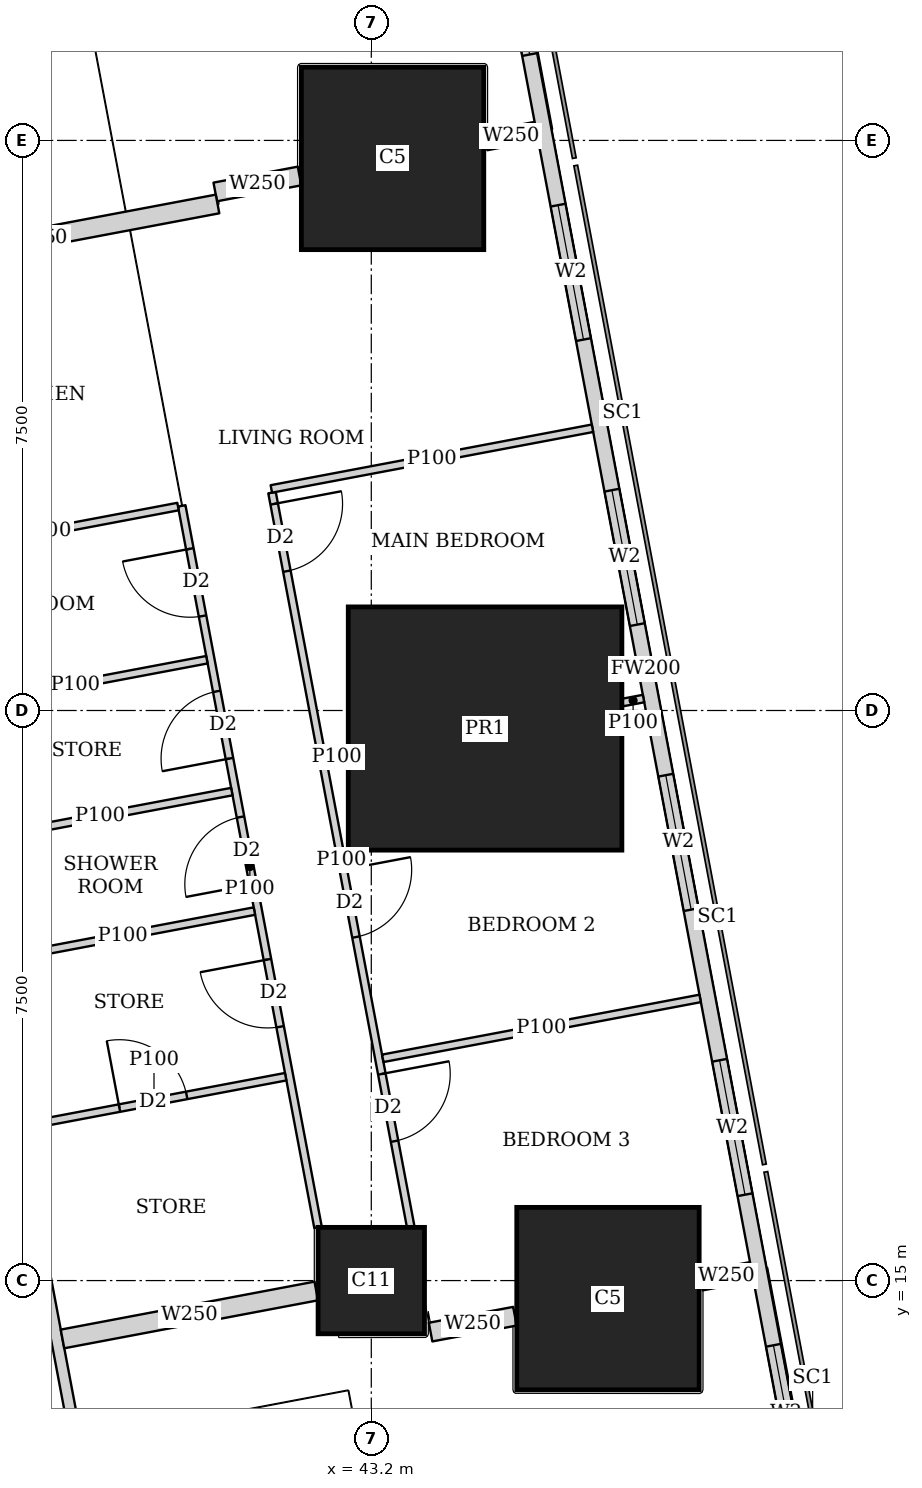
"""IFC4 building model, lengths in metres.
Left out: names, types, materials, properties, quantities, classifications, styles, units other than length and angle.
Written with IfcOpenShell. Run it as: python <this file> out.ifc"""

import sys

from ifc_helpers import new_model, si_unit, direction, frame, frame_2d, origin, origin_2d, place, context, subcontext, project, spatial, rectangle, extrude, element, fill, save


model = new_model("IFC4")
c1 = context("Model", 3, precision=1e-05, world=origin(), true_north=direction((0.0, 1.0)))
c2 = subcontext(c1, "Body", "Model", "MODEL_VIEW")
j1 = project(units=[si_unit("LENGTHUNIT", "METRE"), si_unit("PLANEANGLEUNIT", "RADIAN")], contexts=[c1])
p1 = place(None, origin())
s1 = spatial("IfcSite", under=j1, at=p1, CompositionType="ELEMENT")
p2 = place(p1, origin())
s2 = spatial("IfcBuilding", under=s1, at=p2, CompositionType="ELEMENT")
p3 = place(p2, frame((0.0, 0.0, 208.7)))
s3 = spatial("IfcBuildingStorey", under=s2, at=p3, CompositionType="ELEMENT", Elevation=208.7)
p4 = place(p3, frame((43.2, 15.0, 0.0), z_axis=(0.0, 0.0, 1.0), x_axis=(1.0, 0.0, 0.0)))
e1 = element("IfcColumn", 1, at=p4, inside=s3, PredefinedType="COLUMN", context=c2, shape_type="SweptSolid", body=[
    extrude(rectangle(XDim=1.4, YDim=1.4, at=origin_2d()), origin(), (0.0, 0.0, 1.0), 3.75),
])
p5 = place(p3, frame((46.314, 14.763, 0.0), z_axis=(0.0, 0.0, 1.0), x_axis=(1.0, 0.0, 0.0)))
e2 = element("IfcColumn", 2, at=p5, inside=s3, PredefinedType="COLUMN", context=c2, shape_type="SweptSolid", body=[
    extrude(rectangle(XDim=2.4, YDim=2.4, at=origin_2d()), origin(), (0.0, 0.0, 1.0), 3.75),
])
p6 = place(p3, frame((44.697, 22.263, 0.0), z_axis=(0.0, 0.0, 1.0), x_axis=(1.0, 0.0, 0.0)))
e3 = element("IfcColumn", 3, at=p6, inside=s3, PredefinedType="COLUMN", context=c2, shape_type="SweptSolid", body=[
    extrude(rectangle(XDim=3.6, YDim=3.2, at=origin_2d()), origin(), (0.0, 0.0, 1.0), 3.75),
])
p7 = place(p3, frame((43.48, 29.763, 0.0), z_axis=(0.0, 0.0, 1.0), x_axis=(1.0, 0.0, 0.0)))
e4 = element("IfcColumn", 4, at=p7, inside=s3, PredefinedType="COLUMN", context=c2, shape_type="SweptSolid", body=[
    extrude(rectangle(XDim=2.4, YDim=2.4, at=origin_2d()), origin(), (0.0, 0.0, 1.0), 3.75),
])
p8 = place(p3, frame((50.653, 2.703, 0.0), z_axis=(0.0, 0.0, 1.0), x_axis=(-0.185612026696, 0.982623109613, 0.0)))
e5 = element("IfcWall", 5, at=p8, inside=s3, PredefinedType="SOLIDWALL", context=c2, shape_type="SweptSolid", body=[
    extrude(rectangle(XDim=41.393, YDim=0.2, at=frame_2d((20.697, 0.0))), origin(), (0.0, 0.0, 1.0), 3.5),
])
p9 = place(p8, frame((1.633, 0.0, 0.9)))
e6 = element("IfcOpeningElement", 6, at=p9, cuts=e5, PredefinedType="OPENING", context=c2, shape_type="SweptSolid", body=[
    extrude(rectangle(XDim=1.8, YDim=1.5, at=frame_2d((0.9, 0.75))), frame((0.0, 0.11, 0.0), z_axis=(0.0, -1.0, 0.0), x_axis=(1.0, 0.0, 0.0)), (0.0, 0.0, 1.0), 0.22),
])
p10 = place(p8, frame((6.032, 0.0, 0.9)))
e7 = element("IfcOpeningElement", 7, at=p10, cuts=e5, PredefinedType="OPENING", context=c2, shape_type="SweptSolid", body=[
    extrude(rectangle(XDim=1.8, YDim=1.5, at=frame_2d((0.9, 0.75))), frame((0.0, 0.11, 0.0), z_axis=(0.0, -1.0, 0.0), x_axis=(1.0, 0.0, 0.0)), (0.0, 0.0, 1.0), 0.22),
])
p11 = place(p8, frame((9.848, 0.0, 0.9)))
e8 = element("IfcOpeningElement", 8, at=p11, cuts=e5, PredefinedType="OPENING", context=c2, shape_type="SweptSolid", body=[
    extrude(rectangle(XDim=1.8, YDim=1.5, at=frame_2d((0.9, 0.75))), frame((0.0, 0.11, 0.0), z_axis=(0.0, -1.0, 0.0), x_axis=(1.0, 0.0, 0.0)), (0.0, 0.0, 1.0), 0.22),
])
p12 = place(p8, frame((13.664, 0.0, 0.9)))
e9 = element("IfcOpeningElement", 9, at=p12, cuts=e5, PredefinedType="OPENING", context=c2, shape_type="SweptSolid", body=[
    extrude(rectangle(XDim=1.8, YDim=1.5, at=frame_2d((0.9, 0.75))), frame((0.0, 0.11, 0.0), z_axis=(0.0, -1.0, 0.0), x_axis=(1.0, 0.0, 0.0)), (0.0, 0.0, 1.0), 0.22),
])
p13 = place(p8, frame((17.481, 0.0, 0.9)))
e10 = element("IfcOpeningElement", 10, at=p13, cuts=e5, PredefinedType="OPENING", context=c2, shape_type="SweptSolid", body=[
    extrude(rectangle(XDim=1.8, YDim=1.5, at=frame_2d((0.9, 0.75))), frame((0.0, 0.11, 0.0), z_axis=(0.0, -1.0, 0.0), x_axis=(1.0, 0.0, 0.0)), (0.0, 0.0, 1.0), 0.22),
])
p14 = place(p8, frame((21.297, 0.0, 0.9)))
e11 = element("IfcOpeningElement", 11, at=p14, cuts=e5, PredefinedType="OPENING", context=c2, shape_type="SweptSolid", body=[
    extrude(rectangle(XDim=1.8, YDim=1.5, at=frame_2d((0.9, 0.75))), frame((0.0, 0.11, 0.0), z_axis=(0.0, -1.0, 0.0), x_axis=(1.0, 0.0, 0.0)), (0.0, 0.0, 1.0), 0.22),
])
p15 = place(p8, frame((25.113, 0.0, 0.9)))
e12 = element("IfcOpeningElement", 12, at=p15, cuts=e5, PredefinedType="OPENING", context=c2, shape_type="SweptSolid", body=[
    extrude(rectangle(XDim=1.8, YDim=1.5, at=frame_2d((0.9, 0.75))), frame((0.0, 0.11, 0.0), z_axis=(0.0, -1.0, 0.0), x_axis=(1.0, 0.0, 0.0)), (0.0, 0.0, 1.0), 0.22),
])
p16 = place(p8, frame((28.93, 0.0, 0.9)))
e13 = element("IfcOpeningElement", 13, at=p16, cuts=e5, PredefinedType="OPENING", context=c2, shape_type="SweptSolid", body=[
    extrude(rectangle(XDim=1.8, YDim=1.5, at=frame_2d((0.9, 0.75))), frame((0.0, 0.11, 0.0), z_axis=(0.0, -1.0, 0.0), x_axis=(1.0, 0.0, 0.0)), (0.0, 0.0, 1.0), 0.22),
])
p17 = place(p8, frame((32.746, 0.0, 0.9)))
e14 = element("IfcOpeningElement", 14, at=p17, cuts=e5, PredefinedType="OPENING", context=c2, shape_type="SweptSolid", body=[
    extrude(rectangle(XDim=1.8, YDim=1.5, at=frame_2d((0.9, 0.75))), frame((0.0, 0.11, 0.0), z_axis=(0.0, -1.0, 0.0), x_axis=(1.0, 0.0, 0.0)), (0.0, 0.0, 1.0), 0.22),
])
p18 = place(p8, frame((36.481, 0.0, 0.9)))
e15 = element("IfcOpeningElement", 15, at=p18, cuts=e5, PredefinedType="OPENING", context=c2, shape_type="SweptSolid", body=[
    extrude(rectangle(XDim=1.8, YDim=1.5, at=frame_2d((0.9, 0.75))), frame((0.0, 0.11, 0.0), z_axis=(0.0, -1.0, 0.0), x_axis=(1.0, 0.0, 0.0)), (0.0, 0.0, 1.0), 0.22),
])
p19 = place(p3, frame((33.68, 42.723, 0.0), z_axis=(0.0, 0.0, 1.0), x_axis=(0.185601160014, -0.982625162207, 0.0)))
e16 = element("IfcWall", 16, at=p19, inside=s3, PredefinedType="SOLIDWALL", context=c2, shape_type="SweptSolid", body=[
    extrude(rectangle(XDim=41.051, YDim=0.15, at=frame_2d((20.526, 0.0))), origin(), (0.0, 0.0, 1.0), 2.5),
])
p20 = place(p19, frame((12.307, 0.0, 0.0)))
e17 = element("IfcOpeningElement", 17, at=p20, cuts=e16, PredefinedType="OPENING", context=c2, shape_type="SweptSolid", body=[
    extrude(rectangle(XDim=1.0, YDim=2.1, at=frame_2d((0.5, 1.05))), frame((0.0, 0.085, 0.0), z_axis=(0.0, -1.0, 0.0), x_axis=(1.0, 0.0, 0.0)), (0.0, 0.0, 1.0), 0.17),
])
p21 = place(p19, frame((16.123, 0.0, 0.0)))
e18 = element("IfcOpeningElement", 18, at=p21, cuts=e16, PredefinedType="OPENING", context=c2, shape_type="SweptSolid", body=[
    extrude(rectangle(XDim=1.0, YDim=2.1, at=frame_2d((0.5, 1.05))), frame((0.0, 0.085, 0.0), z_axis=(0.0, -1.0, 0.0), x_axis=(1.0, 0.0, 0.0)), (0.0, 0.0, 1.0), 0.17),
])
p22 = place(p19, frame((30.902, 0.0, 0.0)))
e19 = element("IfcOpeningElement", 19, at=p22, cuts=e16, PredefinedType="OPENING", context=c2, shape_type="SweptSolid", body=[
    extrude(rectangle(XDim=1.0, YDim=2.1, at=frame_2d((0.5, 1.05))), frame((0.0, 0.085, 0.0), z_axis=(0.0, -1.0, 0.0), x_axis=(1.0, 0.0, 0.0)), (0.0, 0.0, 1.0), 0.17),
])
p23 = place(p3, frame((41.894, 25.366, 0.0), z_axis=(0.0, 0.0, 1.0), x_axis=(0.185612905165, -0.982622943675, 0.0)))
e20 = element("IfcWall", 20, at=p23, inside=s3, PredefinedType="PARTITIONING", context=c2, shape_type="SweptSolid", body=[
    extrude(rectangle(XDim=9.827, YDim=0.1, at=frame_2d((4.913, 0.0))), origin(), (0.0, 0.0, 1.0), 2.5),
])
p24 = place(p23, frame((0.151, 0.0, 0.0)))
e21 = element("IfcOpeningElement", 21, at=p24, cuts=e20, PredefinedType="OPENING", context=c2, shape_type="SweptSolid", body=[
    extrude(rectangle(XDim=0.9, YDim=2.1, at=frame_2d((0.45, 1.05))), frame((0.0, 0.06, 0.0), z_axis=(0.0, -1.0, 0.0), x_axis=(1.0, 0.0, 0.0)), (0.0, 0.0, 1.0), 0.12),
])
p25 = place(p23, frame((5.05, 0.0, 0.0)))
e22 = element("IfcOpeningElement", 22, at=p25, cuts=e20, PredefinedType="OPENING", context=c2, shape_type="SweptSolid", body=[
    extrude(rectangle(XDim=0.9, YDim=2.1, at=frame_2d((0.45, 1.05))), frame((0.0, 0.06, 0.0), z_axis=(0.0, -1.0, 0.0), x_axis=(1.0, 0.0, 0.0)), (0.0, 0.0, 1.0), 0.12),
])
p26 = place(p23, frame((7.783, 0.0, 0.0)))
e23 = element("IfcOpeningElement", 23, at=p26, cuts=e20, PredefinedType="OPENING", context=c2, shape_type="SweptSolid", body=[
    extrude(rectangle(XDim=0.9, YDim=2.1, at=frame_2d((0.45, 1.05))), frame((0.0, 0.06, 0.0), z_axis=(0.0, -1.0, 0.0), x_axis=(1.0, 0.0, 0.0)), (0.0, 0.0, 1.0), 0.12),
])
p27 = place(p3, frame((40.706, 25.192, 0.0), z_axis=(0.0, 0.0, 1.0), x_axis=(0.185629824463, -0.982619747547, 0.0)))
e24 = element("IfcWall", 24, at=p27, inside=s3, PredefinedType="PARTITIONING", context=c2, shape_type="SweptSolid", body=[
    extrude(rectangle(XDim=9.659, YDim=0.1, at=frame_2d((4.83, 0.0))), origin(), (0.0, 0.0, 1.0), 2.5),
])
p28 = place(p27, frame((0.575, 0.0, 0.0)))
e25 = element("IfcOpeningElement", 25, at=p28, cuts=e24, PredefinedType="OPENING", context=c2, shape_type="SweptSolid", body=[
    extrude(rectangle(XDim=0.9, YDim=2.1, at=frame_2d((0.45, 1.05))), frame((0.0, 0.06, 0.0), z_axis=(0.0, -1.0, 0.0), x_axis=(1.0, 0.0, 0.0)), (0.0, 0.0, 1.0), 0.12),
])
p29 = place(p27, frame((4.166, 0.0, 0.0)))
e26 = element("IfcOpeningElement", 26, at=p29, cuts=e24, PredefinedType="OPENING", context=c2, shape_type="SweptSolid", body=[
    extrude(rectangle(XDim=0.9, YDim=2.1, at=frame_2d((0.45, 1.05))), frame((0.0, 0.06, 0.0), z_axis=(0.0, -1.0, 0.0), x_axis=(1.0, 0.0, 0.0)), (0.0, 0.0, 1.0), 0.12),
])
p30 = place(p27, frame((2.483, 0.0, 0.0)))
e27 = element("IfcOpeningElement", 27, at=p30, cuts=e24, PredefinedType="OPENING", context=c2, shape_type="SweptSolid", body=[
    extrude(rectangle(XDim=0.9, YDim=2.1, at=frame_2d((0.45, 1.05))), frame((0.0, 0.06, 0.0), z_axis=(0.0, -1.0, 0.0), x_axis=(1.0, 0.0, 0.0)), (0.0, 0.0, 1.0), 0.12),
])
p31 = place(p27, frame((6.074, 0.0, 0.0)))
e28 = element("IfcOpeningElement", 28, at=p31, cuts=e24, PredefinedType="OPENING", context=c2, shape_type="SweptSolid", body=[
    extrude(rectangle(XDim=0.9, YDim=2.1, at=frame_2d((0.45, 1.05))), frame((0.0, 0.06, 0.0), z_axis=(0.0, -1.0, 0.0), x_axis=(1.0, 0.0, 0.0)), (0.0, 0.0, 1.0), 0.12),
])
p32 = place(p3, frame((46.11, 26.213, 0.0), z_axis=(0.0, 0.0, 1.0), x_axis=(-0.982633535512, -0.185556823879, 0.0)))
e29 = element("IfcWall", 29, at=p32, inside=s3, PredefinedType="PARTITIONING", context=c2, shape_type="SweptSolid", body=[
    extrude(rectangle(XDim=4.3, YDim=0.1, at=frame_2d((2.15, 0.0))), origin(), (0.0, 0.0, 1.0), 2.05),
])
p33 = place(p3, frame((46.782, 22.657, 0.0), z_axis=(0.0, 0.0, 1.0), x_axis=(-0.982574553168, -0.185868898601, 0.0)))
e30 = element("IfcWall", 30, at=p33, inside=s3, PredefinedType="PARTITIONING", context=c2, shape_type="SweptSolid", body=[
    extrude(rectangle(XDim=0.28, YDim=0.1, at=frame_2d((0.14, 0.0))), origin(), (0.0, 0.0, 1.0), 3.5),
])
p34 = place(p3, frame((42.887, 21.921, 0.0), z_axis=(0.0, 0.0, 1.0), x_axis=(-0.982688058078, -0.185267861514, 0.0)))
e31 = element("IfcWall", 31, at=p34, inside=s3, PredefinedType="PARTITIONING", context=c2, shape_type="SweptSolid", body=[
    extrude(rectangle(XDim=0.286, YDim=0.1, at=frame_2d((0.143, 0.0))), origin(), (0.0, 0.0, 1.0), 2.5),
])
p35 = place(p3, frame((47.527, 18.712, 0.0), z_axis=(0.0, 0.0, 1.0), x_axis=(-0.982665405803, -0.185387972203, 0.0)))
e32 = element("IfcWall", 32, at=p35, inside=s3, PredefinedType="PARTITIONING", context=c2, shape_type="SweptSolid", body=[
    extrude(rectangle(XDim=4.25, YDim=0.1, at=frame_2d((2.125, 0.0))), origin(), (0.0, 0.0, 1.0), 2.05),
])
p36 = place(p3, frame((40.657, 25.183, 0.0), z_axis=(0.0, 0.0, 1.0), x_axis=(-0.982585626838, -0.185810349366, 0.0)))
e33 = element("IfcWall", 33, at=p36, inside=s3, PredefinedType="PARTITIONING", context=c2, shape_type="SweptSolid", body=[
    extrude(rectangle(XDim=3.525, YDim=0.1, at=frame_2d((1.763, 0.0))), origin(), (0.0, 0.0, 1.0), 3.5),
])
p37 = place(p3, frame((41.365, 21.433, 0.0), z_axis=(0.0, 0.0, 1.0), x_axis=(-0.982638553676, -0.185530247748, 0.0)))
e34 = element("IfcWall", 34, at=p37, inside=s3, PredefinedType="PARTITIONING", context=c2, shape_type="SweptSolid", body=[
    extrude(rectangle(XDim=3.525, YDim=0.1, at=frame_2d((1.763, 0.0))), origin(), (0.0, 0.0, 1.0), 3.5),
])
p38 = place(p3, frame((42.073, 17.682, 0.0), z_axis=(0.0, 0.0, 1.0), x_axis=(-0.98265117712, -0.185463376723, 0.0)))
e35 = element("IfcWall", 35, at=p38, inside=s3, PredefinedType="PARTITIONING", context=c2, shape_type="SweptSolid", body=[
    extrude(rectangle(XDim=3.525, YDim=0.1, at=frame_2d((1.763, 0.0))), origin(), (0.0, 0.0, 1.0), 3.5),
])
p39 = place(p38, frame((1.325, 0.0, 0.0)))
e36 = element("IfcOpeningElement", 36, at=p39, cuts=e35, PredefinedType="OPENING", context=c2, shape_type="SweptSolid", body=[
    extrude(rectangle(XDim=0.9, YDim=2.1, at=frame_2d((0.45, 1.05))), frame((0.0, 0.06, 0.0), z_axis=(0.0, -1.0, 0.0), x_axis=(1.0, 0.0, 0.0)), (0.0, 0.0, 1.0), 0.12),
])
p40 = place(p3, frame((41.037, 23.168, 0.0), z_axis=(0.0, 0.0, 1.0), x_axis=(-0.982638553676, -0.185530247748, 0.0)))
e37 = element("IfcWall", 37, at=p40, inside=s3, PredefinedType="PARTITIONING", context=c2, shape_type="SweptSolid", body=[
    extrude(rectangle(XDim=3.525, YDim=0.1, at=frame_2d((1.763, 0.0))), origin(), (0.0, 0.0, 1.0), 2.5),
])
p41 = place(p3, frame((41.662, 19.861, 0.0), z_axis=(0.0, 0.0, 1.0), x_axis=(-0.982588017646, -0.185797706064, 0.0)))
e38 = element("IfcWall", 38, at=p41, inside=s3, PredefinedType="PARTITIONING", context=c2, shape_type="SweptSolid", body=[
    extrude(rectangle(XDim=3.525, YDim=0.1, at=frame_2d((1.763, 0.0))), origin(), (0.0, 0.0, 1.0), 3.5),
])
p42 = place(p3, frame((45.372, 30.121, 0.0), z_axis=(0.0, 0.0, 1.0), x_axis=(-0.982347993061, -0.187062611252, 0.0)))
e39 = element("IfcWall", 39, at=p42, inside=s3, PredefinedType="SOLIDWALL", context=c2, shape_type="SweptSolid", body=[
    extrude(rectangle(XDim=0.68, YDim=0.25, at=frame_2d((0.34, 0.0))), origin(), (0.0, 0.0, 1.0), 2.05),
])
p43 = place(p3, frame((42.256, 29.532, 0.0), z_axis=(0.0, 0.0, 1.0), x_axis=(-0.982549954272, -0.185998890749, 0.0)))
e40 = element("IfcWall", 40, at=p43, inside=s3, PredefinedType="SOLIDWALL", context=c2, shape_type="SweptSolid", body=[
    extrude(rectangle(XDim=1.129, YDim=0.25, at=frame_2d((0.564, 0.0))), origin(), (0.0, 0.0, 1.0), 2.05),
])
p44 = place(p3, frame((41.177, 29.164, 0.0), z_axis=(0.0, 0.0, 1.0), x_axis=(-0.982642846239, -0.185507511263, 0.0)))
e41 = element("IfcWall", 41, at=p44, inside=s3, PredefinedType="SOLIDWALL", context=c2, shape_type="SweptSolid", body=[
    extrude(rectangle(XDim=4.776, YDim=0.25, at=frame_2d((2.388, 0.0))), origin(), (0.0, 0.0, 1.0), 2.5),
])
p45 = place(p3, frame((48.206, 15.12, 0.0), z_axis=(0.0, 0.0, 1.0), x_axis=(-0.982610999048, -0.18567612811, 0.0)))
e42 = element("IfcWall", 42, at=p45, inside=s3, PredefinedType="SOLIDWALL", context=c2, shape_type="SweptSolid", body=[
    extrude(rectangle(XDim=0.68, YDim=0.25, at=frame_2d((0.34, 0.0))), origin(), (0.0, 0.0, 1.0), 2.05),
])
p46 = place(p3, frame((45.09, 14.531, 0.0), z_axis=(0.0, 0.0, 1.0), x_axis=(-0.982737354171, -0.185006196431, 0.0)))
e43 = element("IfcWall", 43, at=p46, inside=s3, PredefinedType="SOLIDWALL", context=c2, shape_type="SweptSolid", body=[
    extrude(rectangle(XDim=1.13, YDim=0.25, at=frame_2d((0.565, 0.0))), origin(), (0.0, 0.0, 1.0), 2.05),
])
p47 = place(p3, frame((42.476, 14.863, 0.0), z_axis=(0.0, 0.0, 1.0), x_axis=(-0.982603567712, -0.185715450942, 0.0)))
e44 = element("IfcWall", 44, at=p47, inside=s3, PredefinedType="SOLIDWALL", context=c2, shape_type="SweptSolid", body=[
    extrude(rectangle(XDim=3.398, YDim=0.25, at=frame_2d((1.699, 0.0))), origin(), (0.0, 0.0, 1.0), 3.5),
])
p48 = place(p11, origin())
e45 = element("IfcWindow", 45, at=p48, inside=s3, PartitioningType="SINGLE_PANEL", PredefinedType="WINDOW", context=c2, shape_type="SweptSolid", body=[
    extrude(rectangle(XDim=1.8, YDim=1.5, at=frame_2d((0.9, 0.75))), frame((0.0, 0.03, 0.0), z_axis=(0.0, -1.0, 0.0), x_axis=(1.0, 0.0, 0.0)), (0.0, 0.0, 1.0), 0.06),
])
fill(e8, e45)
p49 = place(p12, origin())
e46 = element("IfcWindow", 46, at=p49, inside=s3, PartitioningType="SINGLE_PANEL", PredefinedType="WINDOW", context=c2, shape_type="SweptSolid", body=[
    extrude(rectangle(XDim=1.8, YDim=1.5, at=frame_2d((0.9, 0.75))), frame((0.0, 0.03, 0.0), z_axis=(0.0, -1.0, 0.0), x_axis=(1.0, 0.0, 0.0)), (0.0, 0.0, 1.0), 0.06),
])
fill(e9, e46)
p50 = place(p13, origin())
e47 = element("IfcWindow", 47, at=p50, inside=s3, PartitioningType="SINGLE_PANEL", PredefinedType="WINDOW", context=c2, shape_type="SweptSolid", body=[
    extrude(rectangle(XDim=1.8, YDim=1.5, at=frame_2d((0.9, 0.75))), frame((0.0, 0.03, 0.0), z_axis=(0.0, -1.0, 0.0), x_axis=(1.0, 0.0, 0.0)), (0.0, 0.0, 1.0), 0.06),
])
fill(e10, e47)
p51 = place(p14, origin())
e48 = element("IfcWindow", 48, at=p51, inside=s3, PartitioningType="SINGLE_PANEL", PredefinedType="WINDOW", context=c2, shape_type="SweptSolid", body=[
    extrude(rectangle(XDim=1.8, YDim=1.5, at=frame_2d((0.9, 0.75))), frame((0.0, 0.03, 0.0), z_axis=(0.0, -1.0, 0.0), x_axis=(1.0, 0.0, 0.0)), (0.0, 0.0, 1.0), 0.06),
])
fill(e11, e48)
p52 = place(p15, origin())
e49 = element("IfcWindow", 49, at=p52, inside=s3, PartitioningType="SINGLE_PANEL", PredefinedType="WINDOW", context=c2, shape_type="SweptSolid", body=[
    extrude(rectangle(XDim=1.8, YDim=1.5, at=frame_2d((0.9, 0.75))), frame((0.0, 0.03, 0.0), z_axis=(0.0, -1.0, 0.0), x_axis=(1.0, 0.0, 0.0)), (0.0, 0.0, 1.0), 0.06),
])
fill(e12, e49)
p53 = place(p16, origin())
e50 = element("IfcWindow", 50, at=p53, inside=s3, PartitioningType="SINGLE_PANEL", PredefinedType="WINDOW", context=c2, shape_type="SweptSolid", body=[
    extrude(rectangle(XDim=1.8, YDim=1.5, at=frame_2d((0.9, 0.75))), frame((0.0, 0.03, 0.0), z_axis=(0.0, -1.0, 0.0), x_axis=(1.0, 0.0, 0.0)), (0.0, 0.0, 1.0), 0.06),
])
fill(e13, e50)
p54 = place(p24, origin())
e51 = element("IfcDoor", 51, at=p54, inside=s3, OperationType="SINGLE_SWING_LEFT", PredefinedType="DOOR", context=c2, shape_type="SweptSolid", body=[
    extrude(rectangle(XDim=0.9, YDim=2.1, at=frame_2d((0.45, 1.05))), frame((0.0, 0.025, 0.0), z_axis=(0.0, -1.0, 0.0), x_axis=(1.0, 0.0, 0.0)), (0.0, 0.0, 1.0), 0.05),
])
fill(e21, e51)
p55 = place(p25, origin())
e52 = element("IfcDoor", 52, at=p55, inside=s3, OperationType="SINGLE_SWING_LEFT", PredefinedType="DOOR", context=c2, shape_type="SweptSolid", body=[
    extrude(rectangle(XDim=0.9, YDim=2.1, at=frame_2d((0.45, 1.05))), frame((0.0, 0.025, 0.0), z_axis=(0.0, -1.0, 0.0), x_axis=(1.0, 0.0, 0.0)), (0.0, 0.0, 1.0), 0.05),
])
fill(e22, e52)
p56 = place(p26, origin())
e53 = element("IfcDoor", 53, at=p56, inside=s3, OperationType="SINGLE_SWING_LEFT", PredefinedType="DOOR", context=c2, shape_type="SweptSolid", body=[
    extrude(rectangle(XDim=0.9, YDim=2.1, at=frame_2d((0.45, 1.05))), frame((0.0, 0.025, 0.0), z_axis=(0.0, -1.0, 0.0), x_axis=(1.0, 0.0, 0.0)), (0.0, 0.0, 1.0), 0.05),
])
fill(e23, e53)
p57 = place(p28, origin())
e54 = element("IfcDoor", 54, at=p57, inside=s3, OperationType="SINGLE_SWING_RIGHT", PredefinedType="DOOR", context=c2, shape_type="SweptSolid", body=[
    extrude(rectangle(XDim=0.9, YDim=2.1, at=frame_2d((0.45, 1.05))), frame((0.0, 0.025, 0.0), z_axis=(0.0, -1.0, 0.0), x_axis=(1.0, 0.0, 0.0)), (0.0, 0.0, 1.0), 0.05),
])
fill(e25, e54)
p58 = place(p29, origin())
e55 = element("IfcDoor", 55, at=p58, inside=s3, OperationType="SINGLE_SWING_LEFT", PredefinedType="DOOR", context=c2, shape_type="SweptSolid", body=[
    extrude(rectangle(XDim=0.9, YDim=2.1, at=frame_2d((0.45, 1.05))), frame((0.0, 0.025, 0.0), z_axis=(0.0, -1.0, 0.0), x_axis=(1.0, 0.0, 0.0)), (0.0, 0.0, 1.0), 0.05),
])
fill(e26, e55)
p59 = place(p30, origin())
e56 = element("IfcDoor", 56, at=p59, inside=s3, OperationType="SINGLE_SWING_LEFT", PredefinedType="DOOR", context=c2, shape_type="SweptSolid", body=[
    extrude(rectangle(XDim=0.9, YDim=2.1, at=frame_2d((0.45, 1.05))), frame((0.0, 0.025, 0.0), z_axis=(0.0, -1.0, 0.0), x_axis=(1.0, 0.0, 0.0)), (0.0, 0.0, 1.0), 0.05),
])
fill(e27, e56)
p60 = place(p31, origin())
e57 = element("IfcDoor", 57, at=p60, inside=s3, OperationType="SINGLE_SWING_RIGHT", PredefinedType="DOOR", context=c2, shape_type="SweptSolid", body=[
    extrude(rectangle(XDim=0.9, YDim=2.1, at=frame_2d((0.45, 1.05))), frame((0.0, 0.025, 0.0), z_axis=(0.0, -1.0, 0.0), x_axis=(1.0, 0.0, 0.0)), (0.0, 0.0, 1.0), 0.05),
])
fill(e28, e57)
p61 = place(p39, origin())
e58 = element("IfcDoor", 58, at=p61, inside=s3, OperationType="SINGLE_SWING_LEFT", PredefinedType="DOOR", context=c2, shape_type="SweptSolid", body=[
    extrude(rectangle(XDim=0.9, YDim=2.1, at=frame_2d((0.45, 1.05))), frame((0.0, 0.025, 0.0), z_axis=(0.0, -1.0, 0.0), x_axis=(1.0, 0.0, 0.0)), (0.0, 0.0, 1.0), 0.05),
])
fill(e36, e58)
save(model, sys.argv[1])
